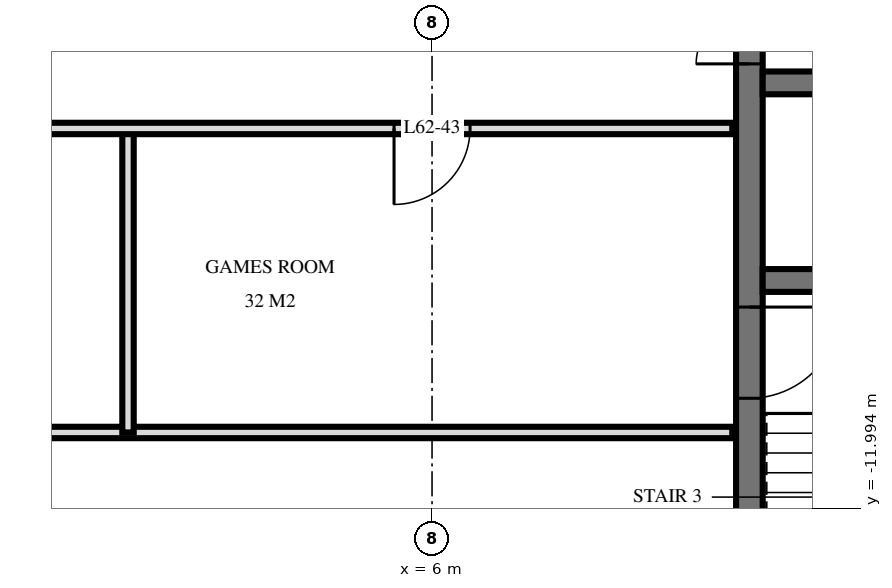
"""IFC4 building model, lengths in metres.
Left out: names, types, materials, properties, quantities, classifications, styles, units other than length and angle.
Written with IfcOpenShell. Run it as: python <this file> out.ifc"""

import sys

from ifc_helpers import new_model, si_unit, direction, frame, frame_2d, origin, place, context, subcontext, project, spatial, rectangle, extrude, element, fill, save


model = new_model("IFC4")
c1 = context("Model", 3, precision=1e-05, world=origin(), true_north=direction((0.0, 1.0)))
c2 = subcontext(c1, "Body", "Model", "MODEL_VIEW")
j1 = project(units=[si_unit("LENGTHUNIT", "METRE"), si_unit("PLANEANGLEUNIT", "RADIAN")], contexts=[c1])
p1 = place(None, origin())
s1 = spatial("IfcSite", under=j1, at=p1, CompositionType="ELEMENT")
p2 = place(p1, origin())
s2 = spatial("IfcBuilding", under=s1, at=p2, CompositionType="ELEMENT")
p3 = place(p2, frame((0.0, 0.0, 236.1)))
s3 = spatial("IfcBuildingStorey", under=s2, at=p3, CompositionType="ELEMENT", Elevation=236.1)
p4 = place(p3, frame((10.175, -14.55, 0.0), z_axis=(0.0, 0.0, 1.0), x_axis=(0.0, 1.0, 0.0)))
e1 = element("IfcWall", 1, at=p4, inside=s3, PredefinedType="SHEAR", context=c2, shape_type="SweptSolid", body=[
    extrude(rectangle(XDim=14.1, YDim=0.35, at=frame_2d((7.05, 0.0))), origin(), (0.0, 0.0, 1.0), 3.5),
])
p5 = place(p4, frame((8.4, 0.0, 0.0)))
e2 = element("IfcOpeningElement", 2, at=p5, cuts=e1, PredefinedType="OPENING", context=c2, shape_type="SweptSolid", body=[
    extrude(rectangle(XDim=1.4, YDim=2.4, at=frame_2d((0.7, 1.2))), frame((0.0, 0.185, 0.0), z_axis=(0.0, -1.0, 0.0), x_axis=(1.0, 0.0, 0.0)), (0.0, 0.0, 1.0), 0.37),
])
p6 = place(p4, frame((10.0, 0.0, 0.0)))
e3 = element("IfcOpeningElement", 3, at=p6, cuts=e1, PredefinedType="OPENING", context=c2, shape_type="SweptSolid", body=[
    extrude(rectangle(XDim=1.4, YDim=2.4, at=frame_2d((0.7, 1.2))), frame((0.0, 0.185, 0.0), z_axis=(0.0, -1.0, 0.0), x_axis=(1.0, 0.0, 0.0)), (0.0, 0.0, 1.0), 0.37),
])
p7 = place(p4, frame((4.0, 0.0, 0.0)))
e4 = element("IfcOpeningElement", 4, at=p7, cuts=e1, PredefinedType="OPENING", context=c2, shape_type="SweptSolid", body=[
    extrude(rectangle(XDim=1.2, YDim=2.1, at=frame_2d((0.6, 1.05))), frame((0.0, 0.185, 0.0), z_axis=(0.0, -1.0, 0.0), x_axis=(1.0, 0.0, 0.0)), (0.0, 0.0, 1.0), 0.37),
])
p8 = place(p3, frame((10.35, -6.4, 0.0), z_axis=(0.0, 0.0, 1.0), x_axis=(1.0, 0.0, 0.0)))
e5 = element("IfcWall", 5, at=p8, inside=s3, PredefinedType="SHEAR", context=c2, shape_type="SweptSolid", body=[
    extrude(rectangle(XDim=13.7, YDim=0.3, at=frame_2d((6.85, 0.0))), origin(), (0.0, 0.0, 1.0), 3.5),
])
p9 = place(p8, frame((12.05, 0.0, 0.0)))
e6 = element("IfcOpeningElement", 6, at=p9, cuts=e5, PredefinedType="OPENING", context=c2, shape_type="SweptSolid", body=[
    extrude(rectangle(XDim=1.1, YDim=2.1, at=frame_2d((0.55, 1.05))), frame((0.0, 0.16, 0.0), z_axis=(0.0, -1.0, 0.0), x_axis=(1.0, 0.0, 0.0)), (0.0, 0.0, 1.0), 0.32),
])
p10 = place(p8, frame((6.8, 0.0, 0.0)))
e7 = element("IfcOpeningElement", 7, at=p10, cuts=e5, PredefinedType="OPENING", context=c2, shape_type="SweptSolid", body=[
    extrude(rectangle(XDim=1.1, YDim=2.1, at=frame_2d((0.55, 1.05))), frame((0.0, 0.16, 0.0), z_axis=(0.0, -1.0, 0.0), x_axis=(1.0, 0.0, 0.0)), (0.0, 0.0, 1.0), 0.32),
])
p11 = place(p3, frame((10.35, -9.0, 0.0), z_axis=(0.0, 0.0, 1.0), x_axis=(1.0, 0.0, 0.0)))
e8 = element("IfcWall", 8, at=p11, inside=s3, PredefinedType="SHEAR", context=c2, shape_type="SweptSolid", body=[
    extrude(rectangle(XDim=13.7, YDim=0.3, at=frame_2d((6.85, 0.0))), origin(), (0.0, 0.0, 1.0), 3.5),
])
p12 = place(p11, frame((3.8, 0.0, 0.0)))
e9 = element("IfcOpeningElement", 9, at=p12, cuts=e8, PredefinedType="OPENING", context=c2, shape_type="SweptSolid", body=[
    extrude(rectangle(XDim=1.1, YDim=2.1, at=frame_2d((0.55, 1.05))), frame((0.0, 0.16, 0.0), z_axis=(0.0, -1.0, 0.0), x_axis=(1.0, 0.0, 0.0)), (0.0, 0.0, 1.0), 0.32),
])
p13 = place(p3, frame((2.0, -11.0, 0.0), z_axis=(0.0, 0.0, 1.0), x_axis=(0.0, 1.0, 0.0)))
e10 = element("IfcWall", 10, at=p13, inside=s3, PredefinedType="PARTITIONING", context=c2, shape_type="SweptSolid", body=[
    extrude(rectangle(XDim=4.0, YDim=0.15, at=frame_2d((2.0, 0.0))), origin(), (0.0, 0.0, 1.0), 3.22),
])
p14 = place(p3, frame((-9.95, -11.0, 0.0), z_axis=(0.0, 0.0, 1.0), x_axis=(1.0, 0.0, 0.0)))
e11 = element("IfcWall", 11, at=p14, inside=s3, PredefinedType="PARTITIONING", context=c2, shape_type="SweptSolid", body=[
    extrude(rectangle(XDim=19.9, YDim=0.15, at=frame_2d((9.95, 0.0))), origin(), (0.0, 0.0, 1.0), 3.22),
])
p15 = place(p14, frame((9.45, 0.0, 0.0)))
e12 = element("IfcOpeningElement", 12, at=p15, cuts=e11, PredefinedType="OPENING", context=c2, shape_type="SweptSolid", body=[
    extrude(rectangle(XDim=1.0, YDim=2.1, at=frame_2d((0.5, 1.05))), frame((0.0, 0.085, 0.0), z_axis=(0.0, -1.0, 0.0), x_axis=(1.0, 0.0, 0.0)), (0.0, 0.0, 1.0), 0.17),
])
p16 = place(p14, frame((3.45, 0.0, 0.0)))
e13 = element("IfcOpeningElement", 13, at=p16, cuts=e11, PredefinedType="OPENING", context=c2, shape_type="SweptSolid", body=[
    extrude(rectangle(XDim=1.0, YDim=2.1, at=frame_2d((0.5, 1.05))), frame((0.0, 0.085, 0.0), z_axis=(0.0, -1.0, 0.0), x_axis=(1.0, 0.0, 0.0)), (0.0, 0.0, 1.0), 0.17),
])
p17 = place(p3, frame((-9.95, -7.0, 0.0), z_axis=(0.0, 0.0, 1.0), x_axis=(1.0, 0.0, 0.0)))
e14 = element("IfcWall", 14, at=p17, inside=s3, PredefinedType="PARTITIONING", context=c2, shape_type="SweptSolid", body=[
    extrude(rectangle(XDim=19.9, YDim=0.15, at=frame_2d((9.95, 0.0))), origin(), (0.0, 0.0, 1.0), 3.22),
])
p18 = place(p17, frame((9.45, 0.0, 0.0)))
e15 = element("IfcOpeningElement", 15, at=p18, cuts=e14, PredefinedType="OPENING", context=c2, shape_type="SweptSolid", body=[
    extrude(rectangle(XDim=1.0, YDim=2.1, at=frame_2d((0.5, 1.05))), frame((0.0, 0.085, 0.0), z_axis=(0.0, -1.0, 0.0), x_axis=(1.0, 0.0, 0.0)), (0.0, 0.0, 1.0), 0.17),
])
p19 = place(p17, frame((15.45, 0.0, 0.0)))
e16 = element("IfcOpeningElement", 16, at=p19, cuts=e14, PredefinedType="OPENING", context=c2, shape_type="SweptSolid", body=[
    extrude(rectangle(XDim=1.0, YDim=2.1, at=frame_2d((0.5, 1.05))), frame((0.0, 0.085, 0.0), z_axis=(0.0, -1.0, 0.0), x_axis=(1.0, 0.0, 0.0)), (0.0, 0.0, 1.0), 0.17),
])
p20 = place(p5, origin())
e17 = element("IfcDoor", 17, at=p20, inside=s3, OperationType="DOUBLE_DOOR_SINGLE_SWING", PredefinedType="DOOR", context=c2, shape_type="SweptSolid", body=[
    extrude(rectangle(XDim=1.4, YDim=2.4, at=frame_2d((0.7, 1.2))), frame((0.0, 0.025, 0.0), z_axis=(0.0, -1.0, 0.0), x_axis=(1.0, 0.0, 0.0)), (0.0, 0.0, 1.0), 0.05),
])
fill(e2, e17)
p21 = place(p7, frame((0.6, 0.0, 0.0), z_axis=(0.0, 0.0, 1.0), x_axis=(-1.0, 0.0, 0.0)))
e18 = element("IfcDoor", 18, at=p21, inside=s3, OperationType="SINGLE_SWING_RIGHT", PredefinedType="DOOR", context=c2, shape_type="SweptSolid", body=[
    extrude(rectangle(XDim=1.2, YDim=2.1, at=frame_2d((0.0, 1.05))), frame((0.0, -0.025, 0.0), z_axis=(0.0, 1.0, 0.0), x_axis=(-1.0, 0.0, 0.0)), (0.0, 0.0, 1.0), 0.05),
])
fill(e4, e18)
p22 = place(p19, frame((0.5, 0.0, 0.0), z_axis=(0.0, 0.0, 1.0), x_axis=(-1.0, 0.0, 0.0)))
e19 = element("IfcDoor", 19, at=p22, inside=s3, OperationType="SINGLE_SWING_LEFT", PredefinedType="DOOR", context=c2, shape_type="SweptSolid", body=[
    extrude(rectangle(XDim=1.0, YDim=2.1, at=frame_2d((0.0, 1.05))), frame((0.0, -0.025, 0.0), z_axis=(0.0, 1.0, 0.0), x_axis=(-1.0, 0.0, 0.0)), (0.0, 0.0, 1.0), 0.05),
])
fill(e16, e19)
save(model, sys.argv[1])
